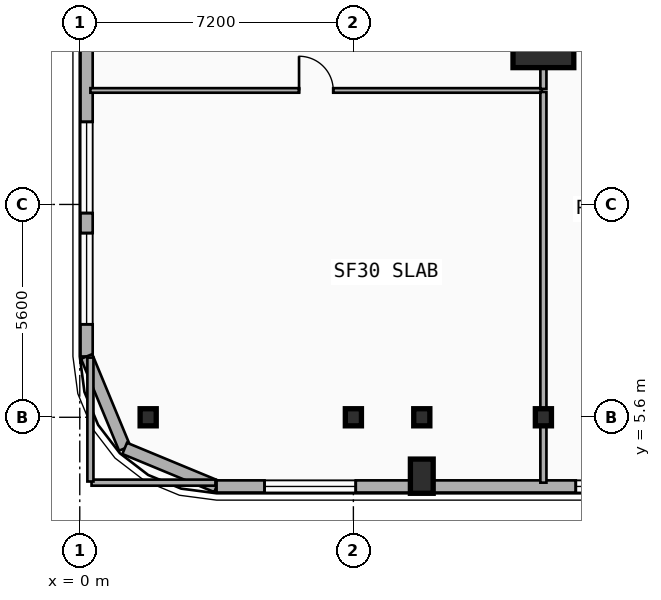
"""IFC4 building model, lengths in metres.
Left out: names, types, materials, properties, quantities, classifications, styles, units other than length and angle.
Written with IfcOpenShell. Run it as: python <this file> out.ifc"""

import sys

from ifc_helpers import new_model, si_unit, direction, frame, frame_2d, origin, origin_2d, place, context, subcontext, project, spatial, rectangle, i_section, extrude, element, fill, save


model = new_model("IFC4")
c1 = context("Model", 3, precision=1e-05, world=origin(), true_north=direction((0.0, 1.0)))
c2 = subcontext(c1, "Body", "Model", "MODEL_VIEW")
j1 = project(units=[si_unit("LENGTHUNIT", "METRE"), si_unit("PLANEANGLEUNIT", "RADIAN")], contexts=[c1])
p1 = place(None, origin())
s1 = spatial("IfcSite", under=j1, at=p1, CompositionType="ELEMENT")
p2 = place(p1, origin())
s2 = spatial("IfcBuilding", under=s1, at=p2, CompositionType="ELEMENT")
p3 = place(p2, frame((0.0, 0.0, 19.4)))
s3 = spatial("IfcBuildingStorey", under=s2, at=p3, CompositionType="ELEMENT", Elevation=19.4)
for number, where, z_axis, x_axis in (
    (1, (1.8, 5.6, 0.0), (0.0, 0.0, 1.0), (1.0, 0.0, 0.0)),
    (2, (7.2, 5.6, 0.0), (0.0, 0.0, 1.0), (1.0, 0.0, 0.0)),
    (3, (9.0, 5.6, 0.0), (0.0, 0.0, 1.0), (1.0, 0.0, 0.0)),
    (4, (12.2, 5.6, 0.0), (0.0, 0.0, 1.0), (1.0, 0.0, 0.0)),
):
    element("IfcColumn", number, at=place(p3, frame(where, z_axis=z_axis, x_axis=x_axis)), inside=s3, PredefinedType="COLUMN", context=c2, shape_type="SweptSolid", body=[
        extrude(i_section(OverallWidth=0.424, OverallDepth=0.45, WebThickness=0.041, FlangeThickness=0.065, FilletRadius=0.015, at=origin_2d()), origin(), (0.0, 0.0, 1.0), 4.8),
    ])
p4 = place(p3, frame((12.2, 15.6, 0.0), z_axis=(0.0, 0.0, 1.0), x_axis=(1.0, 0.0, 0.0)))
e5 = element("IfcColumn", 5, at=p4, inside=s3, PredefinedType="COLUMN", context=c2, shape_type="SweptSolid", body=[
    extrude(rectangle(XDim=1.6, YDim=1.6, at=origin_2d()), origin(), (0.0, 0.0, 1.0), 4.8),
])
p5 = place(p3, frame((9.0, 4.05, 0.0), z_axis=(0.0, 0.0, 1.0), x_axis=(1.0, 0.0, 0.0)))
e6 = element("IfcColumn", 6, at=p5, inside=s3, PredefinedType="PILASTER", context=c2, shape_type="SweptSolid", body=[
    extrude(rectangle(XDim=0.6, YDim=0.9, at=origin_2d()), origin(), (0.0, 0.0, 1.0), 4.8),
])
p6 = place(p3, frame((0.18, 7.2, 0.0), z_axis=(0.0, 0.0, 1.0), x_axis=(0.0, 1.0, 0.0)))
e7 = element("IfcWall", 7, at=p6, inside=s3, PredefinedType="SOLIDWALL", context=c2, shape_type="SweptSolid", body=[
    extrude(rectangle(XDim=34.4, YDim=0.32, at=frame_2d((17.2, 0.0))), origin(), (0.0, 0.0, 1.0), 4.5),
])
p7 = place(p6, frame((22.35, 0.0, 0.9)))
e8 = element("IfcOpeningElement", 8, at=p7, cuts=e7, PredefinedType="OPENING", context=c2, shape_type="SweptSolid", body=[
    extrude(rectangle(XDim=2.4, YDim=1.8, at=frame_2d((1.2, 0.9))), frame((0.0, 0.17, 0.0), z_axis=(0.0, -1.0, 0.0), x_axis=(1.0, 0.0, 0.0)), (0.0, 0.0, 1.0), 0.34),
])
p8 = place(p6, frame((26.4, 0.0, 0.9)))
e9 = element("IfcOpeningElement", 9, at=p8, cuts=e7, PredefinedType="OPENING", context=c2, shape_type="SweptSolid", body=[
    extrude(rectangle(XDim=2.4, YDim=1.8, at=frame_2d((1.2, 0.9))), frame((0.0, 0.17, 0.0), z_axis=(0.0, -1.0, 0.0), x_axis=(1.0, 0.0, 0.0)), (0.0, 0.0, 1.0), 0.34),
])
p9 = place(p6, frame((0.847, 0.0, 0.9)))
e10 = element("IfcOpeningElement", 10, at=p9, cuts=e7, PredefinedType="OPENING", context=c2, shape_type="SweptSolid", body=[
    extrude(rectangle(XDim=2.4, YDim=1.8, at=frame_2d((1.2, 0.9))), frame((0.0, 0.17, 0.0), z_axis=(0.0, -1.0, 0.0), x_axis=(1.0, 0.0, 0.0)), (0.0, 0.0, 1.0), 0.34),
])
p10 = place(p6, frame((3.773, 0.0, 0.9)))
e11 = element("IfcOpeningElement", 11, at=p10, cuts=e7, PredefinedType="OPENING", context=c2, shape_type="SweptSolid", body=[
    extrude(rectangle(XDim=2.4, YDim=1.8, at=frame_2d((1.2, 0.9))), frame((0.0, 0.17, 0.0), z_axis=(0.0, -1.0, 0.0), x_axis=(1.0, 0.0, 0.0)), (0.0, 0.0, 1.0), 0.34),
])
p11 = place(p6, frame((9.25, 0.0, 0.9)))
e12 = element("IfcOpeningElement", 12, at=p11, cuts=e7, PredefinedType="OPENING", context=c2, shape_type="SweptSolid", body=[
    extrude(rectangle(XDim=2.4, YDim=1.8, at=frame_2d((1.2, 0.9))), frame((0.0, 0.17, 0.0), z_axis=(0.0, -1.0, 0.0), x_axis=(1.0, 0.0, 0.0)), (0.0, 0.0, 1.0), 0.34),
])
p12 = place(p6, frame((13.6, 0.0, 0.9)))
e13 = element("IfcOpeningElement", 13, at=p12, cuts=e7, PredefinedType="OPENING", context=c2, shape_type="SweptSolid", body=[
    extrude(rectangle(XDim=2.4, YDim=1.8, at=frame_2d((1.2, 0.9))), frame((0.0, 0.17, 0.0), z_axis=(0.0, -1.0, 0.0), x_axis=(1.0, 0.0, 0.0)), (0.0, 0.0, 1.0), 0.34),
])
p13 = place(p3, frame((1.182, 4.782, 0.0), z_axis=(0.0, 0.0, 1.0), x_axis=(-0.382700522567, 0.923872453333, 0.0)))
e14 = element("IfcWall", 14, at=p13, inside=s3, PredefinedType="SOLIDWALL", context=c2, shape_type="SweptSolid", body=[
    extrude(rectangle(XDim=2.617, YDim=0.32, at=frame_2d((1.309, 0.0))), origin(), (0.0, 0.0, 1.0), 4.5),
])
p14 = place(p3, frame((3.6, 3.78, 0.0), z_axis=(0.0, 0.0, 1.0), x_axis=(-0.923886112352, 0.382667546838, 0.0)))
e15 = element("IfcWall", 15, at=p14, inside=s3, PredefinedType="SOLIDWALL", context=c2, shape_type="SweptSolid", body=[
    extrude(rectangle(XDim=2.618, YDim=0.32, at=frame_2d((1.309, 0.0))), origin(), (0.0, 0.0, 1.0), 4.5),
])
p15 = place(p3, frame((20.6, 3.78, 0.0), z_axis=(0.0, 0.0, 1.0), x_axis=(-1.0, 0.0, 0.0)))
e16 = element("IfcWall", 16, at=p15, inside=s3, PredefinedType="SOLIDWALL", context=c2, shape_type="SweptSolid", body=[
    extrude(rectangle(XDim=17.0, YDim=0.32, at=frame_2d((8.5, 0.0))), origin(), (0.0, 0.0, 1.0), 4.5),
])
p16 = place(p15, frame((13.338, 0.0, 0.9)))
e17 = element("IfcOpeningElement", 17, at=p16, cuts=e16, PredefinedType="OPENING", context=c2, shape_type="SweptSolid", body=[
    extrude(rectangle(XDim=2.4, YDim=1.8, at=frame_2d((1.2, 0.9))), frame((0.0, 0.17, 0.0), z_axis=(0.0, -1.0, 0.0), x_axis=(1.0, 0.0, 0.0)), (0.0, 0.0, 1.0), 0.34),
])
p17 = place(p15, frame((5.148, 0.0, 0.9)))
e18 = element("IfcOpeningElement", 18, at=p17, cuts=e16, PredefinedType="OPENING", context=c2, shape_type="SweptSolid", body=[
    extrude(rectangle(XDim=2.4, YDim=1.8, at=frame_2d((1.2, 0.9))), frame((0.0, 0.17, 0.0), z_axis=(0.0, -1.0, 0.0), x_axis=(1.0, 0.0, 0.0)), (0.0, 0.0, 1.0), 0.34),
])
p18 = place(p3, frame((0.28, 14.2, 0.0), z_axis=(0.0, 0.0, 1.0), x_axis=(1.0, 0.0, 0.0)))
e19 = element("IfcWall", 19, at=p18, inside=s3, PredefinedType="PARTITIONING", context=c2, shape_type="SweptSolid", body=[
    extrude(rectangle(XDim=11.88, YDim=0.12, at=frame_2d((5.94, 0.0))), origin(), (0.0, 0.0, 1.0), 3.666),
])
p19 = place(p18, frame((5.49, 0.0, 0.0)))
e20 = element("IfcOpeningElement", 20, at=p19, cuts=e19, PredefinedType="OPENING", context=c2, shape_type="SweptSolid", body=[
    extrude(rectangle(XDim=0.9, YDim=2.1, at=frame_2d((0.45, 1.05))), frame((0.0, 0.07, 0.0), z_axis=(0.0, -1.0, 0.0), x_axis=(1.0, 0.0, 0.0)), (0.0, 0.0, 1.0), 0.14),
])
p20 = place(p3, frame((12.2, 3.88, 0.0), z_axis=(0.0, 0.0, 1.0), x_axis=(0.0, 1.0, 0.0)))
e21 = element("IfcWall", 21, at=p20, inside=s3, PredefinedType="PARTITIONING", context=c2, shape_type="SweptSolid", body=[
    extrude(rectangle(XDim=10.28, YDim=0.16, at=frame_2d((5.14, 0.0))), origin(), (0.0, 0.0, 1.0), 3.666),
])
p21 = place(p3, frame((12.2, 14.24, 0.0), z_axis=(0.0, 0.0, 1.0), x_axis=(0.0, 1.0, 0.0)))
e22 = element("IfcWall", 22, at=p21, inside=s3, PredefinedType="PARTITIONING", context=c2, shape_type="SweptSolid", body=[
    extrude(rectangle(XDim=11.17, YDim=0.16, at=frame_2d((5.585, 0.0))), origin(), (0.0, 0.0, 1.0), 3.472),
])
for number, where, z_axis, x_axis in (
    (23, (0.31, 3.88, 0.0), (0.0, 0.0, 1.0), (1.0, 0.0, 0.0)),
    (24, (0.28, 3.91, 0.0), (0.0, 0.0, 1.0), (0.0, 1.0, 0.0)),
):
    element("IfcWall", number, at=place(p3, frame(where, z_axis=z_axis, x_axis=x_axis)), inside=s3, PredefinedType="PARTITIONING", context=c2, shape_type="SweptSolid", body=[
        extrude(rectangle(XDim=3.26, YDim=0.16, at=frame_2d((1.63, 0.0))), origin(), (0.0, 0.0, 1.0), 4.5),
    ])
p22 = place(p9, origin())
e25 = element("IfcWindow", 25, at=p22, inside=s3, PartitioningType="SINGLE_PANEL", PredefinedType="WINDOW", context=c2, shape_type="SweptSolid", body=[
    extrude(rectangle(XDim=2.4, YDim=1.8, at=frame_2d((1.2, 0.9))), frame((0.0, 0.03, 0.0), z_axis=(0.0, -1.0, 0.0), x_axis=(1.0, 0.0, 0.0)), (0.0, 0.0, 1.0), 0.06),
])
fill(e10, e25)
p23 = place(p10, origin())
e26 = element("IfcWindow", 26, at=p23, inside=s3, PartitioningType="SINGLE_PANEL", PredefinedType="WINDOW", context=c2, shape_type="SweptSolid", body=[
    extrude(rectangle(XDim=2.4, YDim=1.8, at=frame_2d((1.2, 0.9))), frame((0.0, 0.03, 0.0), z_axis=(0.0, -1.0, 0.0), x_axis=(1.0, 0.0, 0.0)), (0.0, 0.0, 1.0), 0.06),
])
fill(e11, e26)
p24 = place(p16, origin())
e27 = element("IfcWindow", 27, at=p24, inside=s3, PartitioningType="SINGLE_PANEL", PredefinedType="WINDOW", context=c2, shape_type="SweptSolid", body=[
    extrude(rectangle(XDim=2.4, YDim=1.8, at=frame_2d((1.2, 0.9))), frame((0.0, 0.03, 0.0), z_axis=(0.0, -1.0, 0.0), x_axis=(1.0, 0.0, 0.0)), (0.0, 0.0, 1.0), 0.06),
])
fill(e17, e27)
p25 = place(p17, origin())
e28 = element("IfcWindow", 28, at=p25, inside=s3, PartitioningType="SINGLE_PANEL", PredefinedType="WINDOW", context=c2, shape_type="SweptSolid", body=[
    extrude(rectangle(XDim=2.4, YDim=1.8, at=frame_2d((1.2, 0.9))), frame((0.0, 0.03, 0.0), z_axis=(0.0, -1.0, 0.0), x_axis=(1.0, 0.0, 0.0)), (0.0, 0.0, 1.0), 0.06),
])
fill(e18, e28)
p26 = place(p19, origin())
e29 = element("IfcDoor", 29, at=p26, inside=s3, OperationType="SINGLE_SWING_LEFT", PredefinedType="DOOR", context=c2, shape_type="SweptSolid", body=[
    extrude(rectangle(XDim=0.9, YDim=2.1, at=frame_2d((0.45, 1.05))), frame((0.0, 0.025, 0.0), z_axis=(0.0, -1.0, 0.0), x_axis=(1.0, 0.0, 0.0)), (0.0, 0.0, 1.0), 0.05),
])
fill(e20, e29)
save(model, sys.argv[1])
